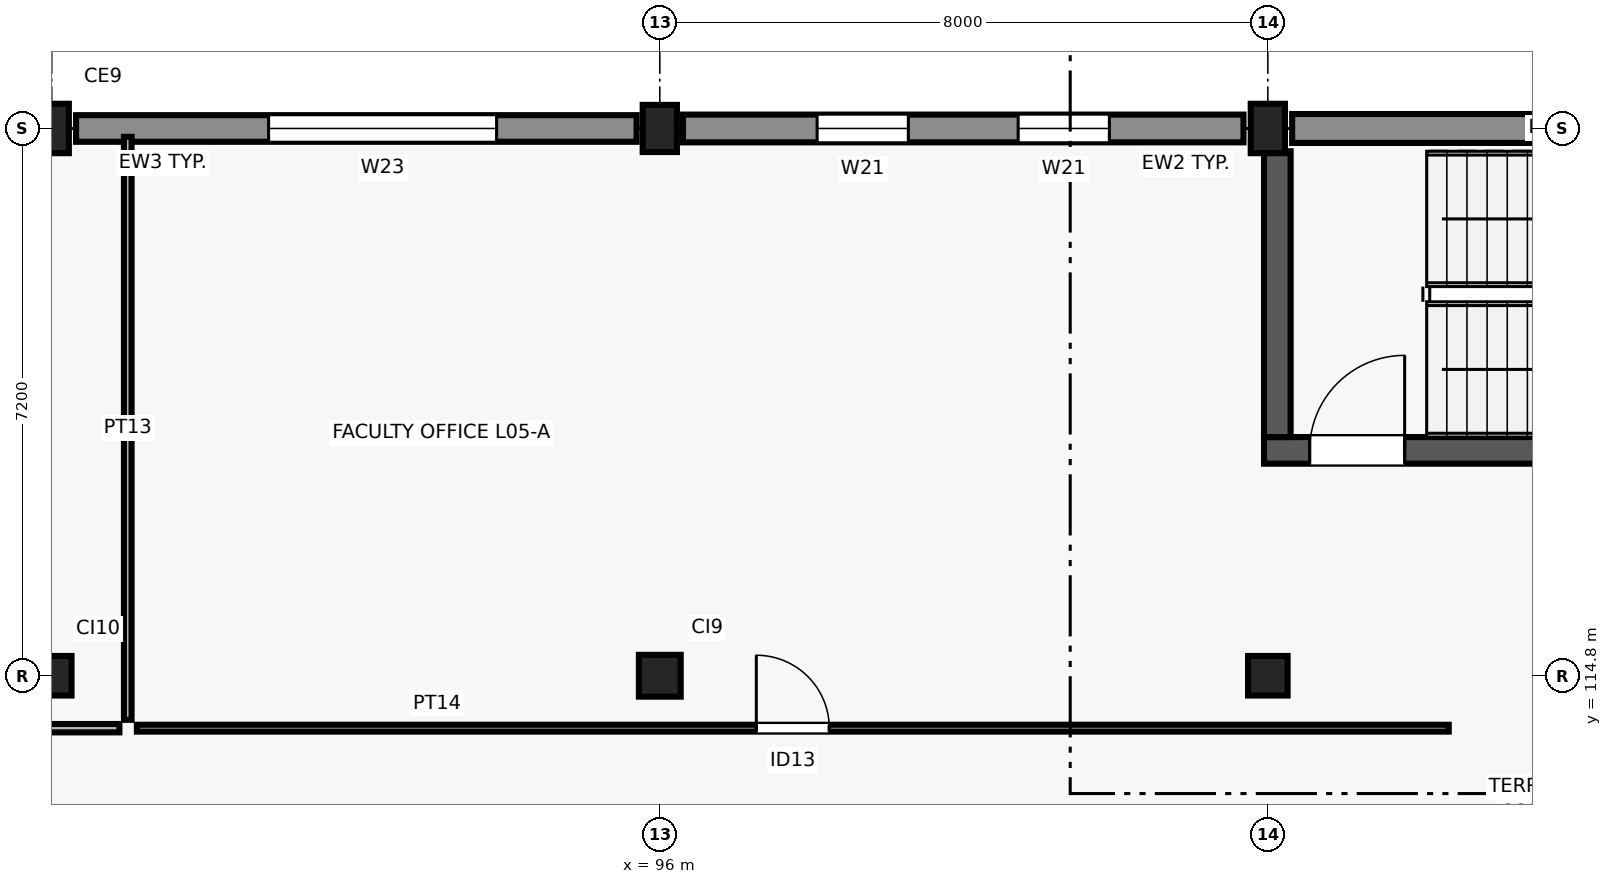
"""IFC4 building model, lengths in metres.
Left out: names, types, materials, properties, quantities, classifications, styles, units other than length and angle.
Written with IfcOpenShell. Run it as: python <this file> out.ifc"""

import sys

from ifc_helpers import new_model, si_unit, direction, frame, frame_2d, origin, origin_2d, place, context, subcontext, project, spatial, rectangle, extrude, element, fill, save


model = new_model("IFC4")
c1 = context("Model", 3, precision=1e-05, world=origin(), true_north=direction((0.0, 1.0)))
c2 = subcontext(c1, "Body", "Model", "MODEL_VIEW")
j1 = project(units=[si_unit("LENGTHUNIT", "METRE"), si_unit("PLANEANGLEUNIT", "RADIAN")], contexts=[c1])
p1 = place(None, origin())
s1 = spatial("IfcSite", under=j1, at=p1, CompositionType="ELEMENT")
p2 = place(p1, origin())
s2 = spatial("IfcBuilding", under=s1, at=p2, CompositionType="ELEMENT")
p3 = place(p2, frame((0.0, 0.0, 21.6)))
s3 = spatial("IfcBuildingStorey", under=s2, at=p3, CompositionType="ELEMENT", Elevation=21.6)
p4 = place(p3, frame((88.0, 114.8, 0.0), z_axis=(0.0, 0.0, 1.0), x_axis=(1.0, 0.0, 0.0)))
e1 = element("IfcColumn", 1, at=p4, inside=s3, PredefinedType="COLUMN", context=c2, shape_type="SweptSolid", body=[
    extrude(rectangle(XDim=0.52, YDim=0.52, at=origin_2d()), origin(), (0.0, 0.0, 1.0), 4.2),
])
p5 = place(p3, frame((88.0, 122.0, 0.0), z_axis=(0.0, 0.0, 1.0), x_axis=(1.0, 0.0, 0.0)))
e2 = element("IfcColumn", 2, at=p5, inside=s3, PredefinedType="COLUMN", context=c2, shape_type="SweptSolid", body=[
    extrude(rectangle(XDim=0.65, YDim=0.45, at=origin_2d()), origin(), (0.0, 0.0, 1.0), 4.2),
])
p6 = place(p3, frame((96.0, 114.8, 0.0), z_axis=(0.0, 0.0, 1.0), x_axis=(1.0, 0.0, 0.0)))
e3 = element("IfcColumn", 3, at=p6, inside=s3, PredefinedType="COLUMN", context=c2, shape_type="SweptSolid", body=[
    extrude(rectangle(XDim=0.55, YDim=0.55, at=origin_2d()), origin(), (0.0, 0.0, 1.0), 4.2),
])
p7 = place(p3, frame((96.0, 122.0, 0.0), z_axis=(0.0, 0.0, 1.0), x_axis=(1.0, 0.0, 0.0)))
e4 = element("IfcColumn", 4, at=p7, inside=s3, PredefinedType="COLUMN", context=c2, shape_type="SweptSolid", body=[
    extrude(rectangle(XDim=0.62, YDim=0.45, at=origin_2d()), origin(), (0.0, 0.0, 1.0), 4.2),
])
p8 = place(p3, frame((104.0, 114.8, 0.0), z_axis=(0.0, 0.0, 1.0), x_axis=(1.0, 0.0, 0.0)))
e5 = element("IfcColumn", 5, at=p8, inside=s3, PredefinedType="COLUMN", context=c2, shape_type="SweptSolid", body=[
    extrude(rectangle(XDim=0.52, YDim=0.52, at=origin_2d()), origin(), (0.0, 0.0, 1.0), 4.2),
])
p9 = place(p3, frame((104.0, 122.0, 0.0), z_axis=(0.0, 0.0, 1.0), x_axis=(1.0, 0.0, 0.0)))
e6 = element("IfcColumn", 6, at=p9, inside=s3, PredefinedType="COLUMN", context=c2, shape_type="SweptSolid", body=[
    extrude(rectangle(XDim=0.65, YDim=0.45, at=origin_2d()), origin(), (0.0, 0.0, 1.0), 4.2),
])
p10 = place(p3, frame((111.695, 122.0, 0.0), z_axis=(0.0, 0.0, 1.0), x_axis=(-1.0, 0.0, 0.0)))
e7 = element("IfcWall", 7, at=p10, inside=s3, PredefinedType="SOLIDWALL", context=c2, shape_type="SweptSolid", body=[
    extrude(rectangle(XDim=7.375, YDim=0.38, at=frame_2d((3.688, 0.0))), origin(), (0.0, 0.0, 1.0), 3.92),
])
p11 = place(p3, frame((103.68, 122.0, 0.0), z_axis=(0.0, 0.0, 1.0), x_axis=(-1.0, 0.0, 0.0)))
e8 = element("IfcWall", 8, at=p11, inside=s3, PredefinedType="SOLIDWALL", context=c2, shape_type="SweptSolid", body=[
    extrude(rectangle(XDim=7.375, YDim=0.365, at=frame_2d((3.688, 0.0))), origin(), (0.0, 0.0, 1.0), 3.43),
])
p12 = place(p11, frame((1.765, 0.0, 0.9)))
e9 = element("IfcOpeningElement", 9, at=p12, cuts=e8, PredefinedType="OPENING", context=c2, shape_type="SweptSolid", body=[
    extrude(rectangle(XDim=1.2, YDim=1.25, at=frame_2d((0.6, 0.625))), frame((0.0, 0.192, 0.0), z_axis=(0.0, -1.0, 0.0), x_axis=(1.0, 0.0, 0.0)), (0.0, 0.0, 1.0), 0.385),
])
p13 = place(p11, frame((4.41, 0.0, 0.9)))
e10 = element("IfcOpeningElement", 10, at=p13, cuts=e8, PredefinedType="OPENING", context=c2, shape_type="SweptSolid", body=[
    extrude(rectangle(XDim=1.2, YDim=1.25, at=frame_2d((0.6, 0.625))), frame((0.0, 0.192, 0.0), z_axis=(0.0, -1.0, 0.0), x_axis=(1.0, 0.0, 0.0)), (0.0, 0.0, 1.0), 0.385),
])
p14 = place(p3, frame((95.695, 122.0, 0.0), z_axis=(0.0, 0.0, 1.0), x_axis=(-1.0, 0.0, 0.0)))
e11 = element("IfcWall", 11, at=p14, inside=s3, PredefinedType="SOLIDWALL", context=c2, shape_type="SweptSolid", body=[
    extrude(rectangle(XDim=7.375, YDim=0.35, at=frame_2d((3.688, 0.0))), origin(), (0.0, 0.0, 1.0), 3.3),
])
p15 = place(p14, frame((1.842, 0.0, 0.9)))
e12 = element("IfcOpeningElement", 12, at=p15, cuts=e11, PredefinedType="OPENING", context=c2, shape_type="SweptSolid", body=[
    extrude(rectangle(XDim=3.0, YDim=1.65, at=frame_2d((1.5, 0.825))), frame((0.0, 0.185, 0.0), z_axis=(0.0, -1.0, 0.0), x_axis=(1.0, 0.0, 0.0)), (0.0, 0.0, 1.0), 0.37),
])
p16 = place(p3, frame((103.95, 117.765, 0.0), z_axis=(0.0, 0.0, 1.0), x_axis=(1.0, 0.0, 0.0)))
e13 = element("IfcWall", 13, at=p16, inside=s3, PredefinedType="SHEAR", context=c2, shape_type="SweptSolid", body=[
    extrude(rectangle(XDim=8.1, YDim=0.35, at=frame_2d((4.05, 0.0))), origin(), (0.0, 0.0, 1.0), 3.92),
])
p17 = place(p16, frame((0.6, 0.0, 0.0)))
e14 = element("IfcOpeningElement", 14, at=p17, cuts=e13, PredefinedType="OPENING", context=c2, shape_type="SweptSolid", body=[
    extrude(rectangle(XDim=1.25, YDim=2.2, at=frame_2d((0.625, 1.1))), frame((0.0, 0.185, 0.0), z_axis=(0.0, -1.0, 0.0), x_axis=(1.0, 0.0, 0.0)), (0.0, 0.0, 1.0), 0.37),
])
p18 = place(p3, frame((104.125, 117.94, 0.0), z_axis=(0.0, 0.0, 1.0), x_axis=(0.0, 1.0, 0.0)))
e15 = element("IfcWall", 15, at=p18, inside=s3, PredefinedType="SHEAR", context=c2, shape_type="SweptSolid", body=[
    extrude(rectangle(XDim=3.76, YDim=0.35, at=frame_2d((1.88, 0.0))), origin(), (0.0, 0.0, 1.0), 3.92),
])
p19 = place(p3, frame((64.11, 114.11, 0.0), z_axis=(0.0, 0.0, 1.0), x_axis=(1.0, 0.0, 0.0)))
e16 = element("IfcWall", 16, at=p19, inside=s3, PredefinedType="PARTITIONING", context=c2, shape_type="SweptSolid", body=[
    extrude(rectangle(XDim=24.78, YDim=0.11, at=frame_2d((12.39, 0.0))), origin(), (0.0, 0.0, 1.0), 3.9),
])
p20 = place(p19, frame((11.85, 0.0, 0.0)))
e17 = element("IfcOpeningElement", 17, at=p20, cuts=e16, PredefinedType="OPENING", context=c2, shape_type="SweptSolid", body=[
    extrude(rectangle(XDim=1.08, YDim=2.15, at=frame_2d((0.54, 1.075))), frame((0.0, 0.065, 0.0), z_axis=(0.0, -1.0, 0.0), x_axis=(1.0, 0.0, 0.0)), (0.0, 0.0, 1.0), 0.13),
])
p21 = place(p3, frame((89.0, 114.22, 0.0), z_axis=(0.0, 0.0, 1.0), x_axis=(0.0, 1.0, 0.0)))
e18 = element("IfcWall", 18, at=p21, inside=s3, PredefinedType="PARTITIONING", context=c2, shape_type="SweptSolid", body=[
    extrude(rectangle(XDim=7.67, YDim=0.1, at=frame_2d((3.835, 0.0))), origin(), (0.0, 0.0, 1.0), 3.9),
])
p22 = place(p3, frame((89.12, 114.11, 0.0), z_axis=(0.0, 0.0, 1.0), x_axis=(1.0, 0.0, 0.0)))
e19 = element("IfcWall", 19, at=p22, inside=s3, PredefinedType="PARTITIONING", context=c2, shape_type="SweptSolid", body=[
    extrude(rectangle(XDim=17.26, YDim=0.09, at=frame_2d((8.63, 0.0))), origin(), (0.0, 0.0, 1.0), 3.9),
])
p23 = place(p22, frame((8.15, 0.0, 0.0)))
e20 = element("IfcOpeningElement", 20, at=p23, cuts=e19, PredefinedType="OPENING", context=c2, shape_type="SweptSolid", body=[
    extrude(rectangle(XDim=0.96, YDim=2.15, at=frame_2d((0.48, 1.075))), frame((0.0, 0.055, 0.0), z_axis=(0.0, -1.0, 0.0), x_axis=(1.0, 0.0, 0.0)), (0.0, 0.0, 1.0), 0.11),
])
p24 = place(p12, origin())
e21 = element("IfcWindow", 21, at=p24, inside=s3, PartitioningType="SINGLE_PANEL", PredefinedType="WINDOW", context=c2, shape_type="SweptSolid", body=[
    extrude(rectangle(XDim=1.2, YDim=1.25, at=frame_2d((0.6, 0.625))), frame((0.0, 0.03, 0.0), z_axis=(0.0, -1.0, 0.0), x_axis=(1.0, 0.0, 0.0)), (0.0, 0.0, 1.0), 0.06),
])
fill(e9, e21)
p25 = place(p13, origin())
e22 = element("IfcWindow", 22, at=p25, inside=s3, PartitioningType="SINGLE_PANEL", PredefinedType="WINDOW", context=c2, shape_type="SweptSolid", body=[
    extrude(rectangle(XDim=1.2, YDim=1.25, at=frame_2d((0.6, 0.625))), frame((0.0, 0.03, 0.0), z_axis=(0.0, -1.0, 0.0), x_axis=(1.0, 0.0, 0.0)), (0.0, 0.0, 1.0), 0.06),
])
fill(e10, e22)
p26 = place(p15, origin())
e23 = element("IfcWindow", 23, at=p26, inside=s3, PartitioningType="SINGLE_PANEL", PredefinedType="WINDOW", context=c2, shape_type="SweptSolid", body=[
    extrude(rectangle(XDim=3.0, YDim=1.65, at=frame_2d((1.5, 0.825))), frame((0.0, 0.03, 0.0), z_axis=(0.0, -1.0, 0.0), x_axis=(1.0, 0.0, 0.0)), (0.0, 0.0, 1.0), 0.06),
])
fill(e12, e23)
p27 = place(p17, origin())
e24 = element("IfcDoor", 24, at=p27, inside=s3, OperationType="SINGLE_SWING_RIGHT", PredefinedType="DOOR", context=c2, shape_type="SweptSolid", body=[
    extrude(rectangle(XDim=1.25, YDim=2.2, at=frame_2d((0.625, 1.1))), frame((0.0, 0.025, 0.0), z_axis=(0.0, -1.0, 0.0), x_axis=(1.0, 0.0, 0.0)), (0.0, 0.0, 1.0), 0.05),
])
fill(e14, e24)
p28 = place(p23, origin())
e25 = element("IfcDoor", 25, at=p28, inside=s3, OperationType="SINGLE_SWING_LEFT", PredefinedType="DOOR", context=c2, shape_type="SweptSolid", body=[
    extrude(rectangle(XDim=0.96, YDim=2.15, at=frame_2d((0.48, 1.075))), frame((0.0, 0.025, 0.0), z_axis=(0.0, -1.0, 0.0), x_axis=(1.0, 0.0, 0.0)), (0.0, 0.0, 1.0), 0.05),
])
fill(e20, e25)
save(model, sys.argv[1])
